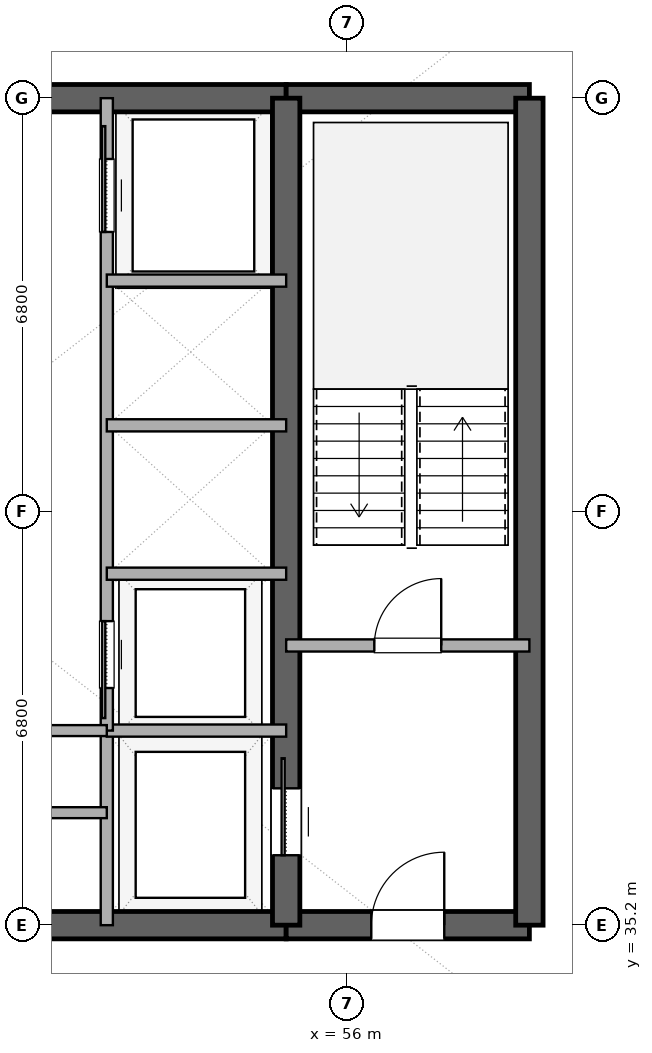
"""IFC4 building model, lengths in metres.
Left out: names, types, materials, properties, quantities, classifications, styles, units other than length and angle.
Written with IfcOpenShell. Run it as: python <this file> out.ifc"""

import sys

from ifc_helpers import new_model, si_unit, direction, frame, frame_2d, origin, place, context, subcontext, project, spatial, rectangle, extrude, element, fill, save


model = new_model("IFC4")
c1 = context("Model", 3, precision=1e-05, world=origin(), true_north=direction((0.0, 1.0)))
c2 = subcontext(c1, "Body", "Model", "MODEL_VIEW")
j1 = project(units=[si_unit("LENGTHUNIT", "METRE"), si_unit("PLANEANGLEUNIT", "RADIAN")], contexts=[c1])
p1 = place(None, origin())
s1 = spatial("IfcSite", under=j1, at=p1, CompositionType="ELEMENT")
p2 = place(p1, origin())
s2 = spatial("IfcBuilding", under=s1, at=p2, CompositionType="ELEMENT")
p3 = place(p2, frame((0.0, 0.0, 190.2)))
s3 = spatial("IfcBuildingStorey", under=s2, at=p3, CompositionType="ELEMENT", Elevation=190.2)
p4 = place(p3, frame((41.0, 35.2, 0.0), z_axis=(0.0, 0.0, 1.0), x_axis=(1.0, 0.0, 0.0)))
e1 = element("IfcWall", 1, at=p4, inside=s3, PredefinedType="SHEAR", context=c2, shape_type="SweptSolid", body=[
    extrude(rectangle(XDim=14.0, YDim=0.45, at=frame_2d((7.0, 0.0))), origin(), (0.0, 0.0, 1.0), 3.38),
])
p5 = place(p4, frame((6.1, 0.0, 0.0)))
e2 = element("IfcOpeningElement", 2, at=p5, cuts=e1, PredefinedType="OPENING", context=c2, shape_type="SweptSolid", body=[
    extrude(rectangle(XDim=1.8, YDim=2.25, at=frame_2d((0.9, 1.125))), frame((0.0, 0.235, 0.0), z_axis=(0.0, -1.0, 0.0), x_axis=(1.0, 0.0, 0.0)), (0.0, 0.0, 1.0), 0.47),
])
p6 = place(p3, frame((55.0, 35.2, 0.0), z_axis=(0.0, 0.0, 1.0), x_axis=(1.0, 0.0, 0.0)))
e3 = element("IfcWall", 3, at=p6, inside=s3, PredefinedType="SHEAR", context=c2, shape_type="SweptSolid", body=[
    extrude(rectangle(XDim=4.0, YDim=0.45, at=frame_2d((2.0, 0.0))), origin(), (0.0, 0.0, 1.0), 3.38),
])
p7 = place(p6, frame((1.4, 0.0, 0.0)))
e4 = element("IfcOpeningElement", 4, at=p7, cuts=e3, PredefinedType="OPENING", context=c2, shape_type="SweptSolid", body=[
    extrude(rectangle(XDim=1.2, YDim=2.15, at=frame_2d((0.6, 1.075))), frame((0.0, 0.235, 0.0), z_axis=(0.0, -1.0, 0.0), x_axis=(1.0, 0.0, 0.0)), (0.0, 0.0, 1.0), 0.47),
])
p8 = place(p3, frame((41.0, 48.8, 0.0), z_axis=(0.0, 0.0, 1.0), x_axis=(1.0, 0.0, 0.0)))
e5 = element("IfcWall", 5, at=p8, inside=s3, PredefinedType="SHEAR", context=c2, shape_type="SweptSolid", body=[
    extrude(rectangle(XDim=14.0, YDim=0.45, at=frame_2d((7.0, 0.0))), origin(), (0.0, 0.0, 1.0), 3.38),
])
p9 = place(p8, frame((6.1, 0.0, 0.0)))
e6 = element("IfcOpeningElement", 6, at=p9, cuts=e5, PredefinedType="OPENING", context=c2, shape_type="SweptSolid", body=[
    extrude(rectangle(XDim=1.8, YDim=2.25, at=frame_2d((0.9, 1.125))), frame((0.0, 0.235, 0.0), z_axis=(0.0, -1.0, 0.0), x_axis=(1.0, 0.0, 0.0)), (0.0, 0.0, 1.0), 0.47),
])
p10 = place(p3, frame((55.0, 48.8, 0.0), z_axis=(0.0, 0.0, 1.0), x_axis=(1.0, 0.0, 0.0)))
e7 = element("IfcWall", 7, at=p10, inside=s3, PredefinedType="SHEAR", context=c2, shape_type="SweptSolid", body=[
    extrude(rectangle(XDim=4.0, YDim=0.45, at=frame_2d((2.0, 0.0))), origin(), (0.0, 0.0, 1.0), 3.38),
])
p11 = place(p3, frame((59.0, 35.2, 0.0), z_axis=(0.0, 0.0, 1.0), x_axis=(0.0, 1.0, 0.0)))
e8 = element("IfcWall", 8, at=p11, inside=s3, PredefinedType="SHEAR", context=c2, shape_type="SweptSolid", body=[
    extrude(rectangle(XDim=13.6, YDim=0.45, at=frame_2d((6.8, 0.0))), origin(), (0.0, 0.0, 1.0), 3.38),
])
p12 = place(p3, frame((55.0, 35.2, 0.0), z_axis=(0.0, 0.0, 1.0), x_axis=(0.0, 1.0, 0.0)))
e9 = element("IfcWall", 9, at=p12, inside=s3, PredefinedType="SHEAR", context=c2, shape_type="SweptSolid", body=[
    extrude(rectangle(XDim=13.6, YDim=0.45, at=frame_2d((6.8, 0.0))), origin(), (0.0, 0.0, 1.0), 3.38),
])
p13 = place(p12, frame((1.15, 0.0, 0.0)))
e10 = element("IfcOpeningElement", 10, at=p13, cuts=e9, PredefinedType="OPENING", context=c2, shape_type="SweptSolid", body=[
    extrude(rectangle(XDim=1.1, YDim=2.2, at=frame_2d((0.55, 1.1))), frame((0.0, 0.235, 0.0), z_axis=(0.0, -1.0, 0.0), x_axis=(1.0, 0.0, 0.0)), (0.0, 0.0, 1.0), 0.47),
])
p14 = place(p3, frame((55.0, 39.8, 0.0), z_axis=(0.0, 0.0, 1.0), x_axis=(1.0, 0.0, 0.0)))
e11 = element("IfcWall", 11, at=p14, inside=s3, PredefinedType="SOLIDWALL", context=c2, shape_type="SweptSolid", body=[
    extrude(rectangle(XDim=4.0, YDim=0.2, at=frame_2d((2.0, 0.0))), origin(), (0.0, 0.0, 1.0), 2.74),
])
p15 = place(p14, frame((1.45, 0.0, 0.0)))
e12 = element("IfcOpeningElement", 12, at=p15, cuts=e11, PredefinedType="OPENING", context=c2, shape_type="SweptSolid", body=[
    extrude(rectangle(XDim=1.1, YDim=2.15, at=frame_2d((0.55, 1.075))), frame((0.0, 0.11, 0.0), z_axis=(0.0, -1.0, 0.0), x_axis=(1.0, 0.0, 0.0)), (0.0, 0.0, 1.0), 0.22),
])
p16 = place(p3, frame((52.05, 35.2, 0.0), z_axis=(0.0, 0.0, 1.0), x_axis=(0.0, 1.0, 0.0)))
e13 = element("IfcWall", 13, at=p16, inside=s3, PredefinedType="SOLIDWALL", context=c2, shape_type="SweptSolid", body=[
    extrude(rectangle(XDim=3.2, YDim=0.2, at=frame_2d((1.6, 0.0))), origin(), (0.0, 0.0, 1.0), 2.74),
])
p17 = place(p3, frame((52.05, 38.4, 0.0), z_axis=(0.0, 0.0, 1.0), x_axis=(1.0, 0.0, 0.0)))
e14 = element("IfcWall", 14, at=p17, inside=s3, PredefinedType="SOLIDWALL", context=c2, shape_type="SweptSolid", body=[
    extrude(rectangle(XDim=2.95, YDim=0.2, at=frame_2d((1.475, 0.0))), origin(), (0.0, 0.0, 1.0), 2.74),
])
p18 = place(p3, frame((52.05, 38.4, 0.0), z_axis=(0.0, 0.0, 1.0), x_axis=(0.0, 1.0, 0.0)))
e15 = element("IfcWall", 15, at=p18, inside=s3, PredefinedType="SOLIDWALL", context=c2, shape_type="SweptSolid", body=[
    extrude(rectangle(XDim=10.4, YDim=0.2, at=frame_2d((5.2, 0.0))), origin(), (0.0, 0.0, 1.0), 2.74),
])
p19 = place(p18, frame((0.7, 0.0, 0.0)))
e16 = element("IfcOpeningElement", 16, at=p19, cuts=e15, PredefinedType="OPENING", context=c2, shape_type="SweptSolid", body=[
    extrude(rectangle(XDim=1.1, YDim=2.2, at=frame_2d((0.55, 1.1))), frame((0.0, 0.11, 0.0), z_axis=(0.0, -1.0, 0.0), x_axis=(1.0, 0.0, 0.0)), (0.0, 0.0, 1.0), 0.22),
])
p20 = place(p18, frame((8.2, 0.0, 0.0)))
e17 = element("IfcOpeningElement", 17, at=p20, cuts=e15, PredefinedType="OPENING", context=c2, shape_type="SweptSolid", body=[
    extrude(rectangle(XDim=1.2, YDim=2.2, at=frame_2d((0.6, 1.1))), frame((0.0, 0.11, 0.0), z_axis=(0.0, -1.0, 0.0), x_axis=(1.0, 0.0, 0.0)), (0.0, 0.0, 1.0), 0.22),
])
for number, where, z_axis, x_axis in (
    (18, (52.05, 40.98, 0.0), (0.0, 0.0, 1.0), (1.0, 0.0, 0.0)),
    (19, (52.05, 43.42, 0.0), (0.0, 0.0, 1.0), (1.0, 0.0, 0.0)),
    (20, (52.05, 45.8, 0.0), (0.0, 0.0, 1.0), (1.0, 0.0, 0.0)),
):
    element("IfcWall", number, at=place(p3, frame(where, z_axis=z_axis, x_axis=x_axis)), inside=s3, PredefinedType="SOLIDWALL", context=c2, shape_type="SweptSolid", body=[
        extrude(rectangle(XDim=2.95, YDim=0.2, at=frame_2d((1.475, 0.0))), origin(), (0.0, 0.0, 1.0), 2.74),
    ])
for number, where, z_axis, x_axis in (
    (21, (49.2, 37.05, 0.0), (0.0, 0.0, 1.0), (1.0, 0.0, 0.0)),
    (22, (49.2, 38.4, 0.0), (0.0, 0.0, 1.0), (1.0, 0.0, 0.0)),
):
    element("IfcWall", number, at=place(p3, frame(where, z_axis=z_axis, x_axis=x_axis)), inside=s3, PredefinedType="PLUMBINGWALL", context=c2, shape_type="SweptSolid", body=[
        extrude(rectangle(XDim=2.85, YDim=0.18, at=frame_2d((1.425, 0.0))), origin(), (0.0, 0.0, 1.0), 2.74),
    ])
p21 = place(p13, origin())
e23 = element("IfcDoor", 23, at=p21, inside=s3, OperationType="SLIDING_TO_RIGHT", PredefinedType="DOOR", context=c2, shape_type="SweptSolid", body=[
    extrude(rectangle(XDim=1.1, YDim=2.2, at=frame_2d((0.55, 1.1))), frame((0.0, 0.025, 0.0), z_axis=(0.0, -1.0, 0.0), x_axis=(1.0, 0.0, 0.0)), (0.0, 0.0, 1.0), 0.05),
])
fill(e10, e23)
p22 = place(p7, origin())
e24 = element("IfcDoor", 24, at=p22, inside=s3, OperationType="SINGLE_SWING_RIGHT", PredefinedType="DOOR", context=c2, shape_type="SweptSolid", body=[
    extrude(rectangle(XDim=1.2, YDim=2.15, at=frame_2d((0.6, 1.075))), frame((0.0, 0.025, 0.0), z_axis=(0.0, -1.0, 0.0), x_axis=(1.0, 0.0, 0.0)), (0.0, 0.0, 1.0), 0.05),
])
fill(e4, e24)
p23 = place(p15, origin())
e25 = element("IfcDoor", 25, at=p23, inside=s3, OperationType="SINGLE_SWING_RIGHT", PredefinedType="DOOR", context=c2, shape_type="SweptSolid", body=[
    extrude(rectangle(XDim=1.1, YDim=2.15, at=frame_2d((0.55, 1.075))), frame((0.0, 0.025, 0.0), z_axis=(0.0, -1.0, 0.0), x_axis=(1.0, 0.0, 0.0)), (0.0, 0.0, 1.0), 0.05),
])
fill(e12, e25)
p24 = place(p19, origin())
e26 = element("IfcDoor", 26, at=p24, inside=s3, OperationType="SLIDING_TO_LEFT", PredefinedType="DOOR", context=c2, shape_type="SweptSolid", body=[
    extrude(rectangle(XDim=1.1, YDim=2.2, at=frame_2d((0.55, 1.1))), frame((0.0, 0.025, 0.0), z_axis=(0.0, -1.0, 0.0), x_axis=(1.0, 0.0, 0.0)), (0.0, 0.0, 1.0), 0.05),
])
fill(e16, e26)
p25 = place(p20, origin())
e27 = element("IfcDoor", 27, at=p25, inside=s3, OperationType="SLIDING_TO_RIGHT", PredefinedType="DOOR", context=c2, shape_type="SweptSolid", body=[
    extrude(rectangle(XDim=1.2, YDim=2.2, at=frame_2d((0.6, 1.1))), frame((0.0, 0.025, 0.0), z_axis=(0.0, -1.0, 0.0), x_axis=(1.0, 0.0, 0.0)), (0.0, 0.0, 1.0), 0.05),
])
fill(e17, e27)
save(model, sys.argv[1])
